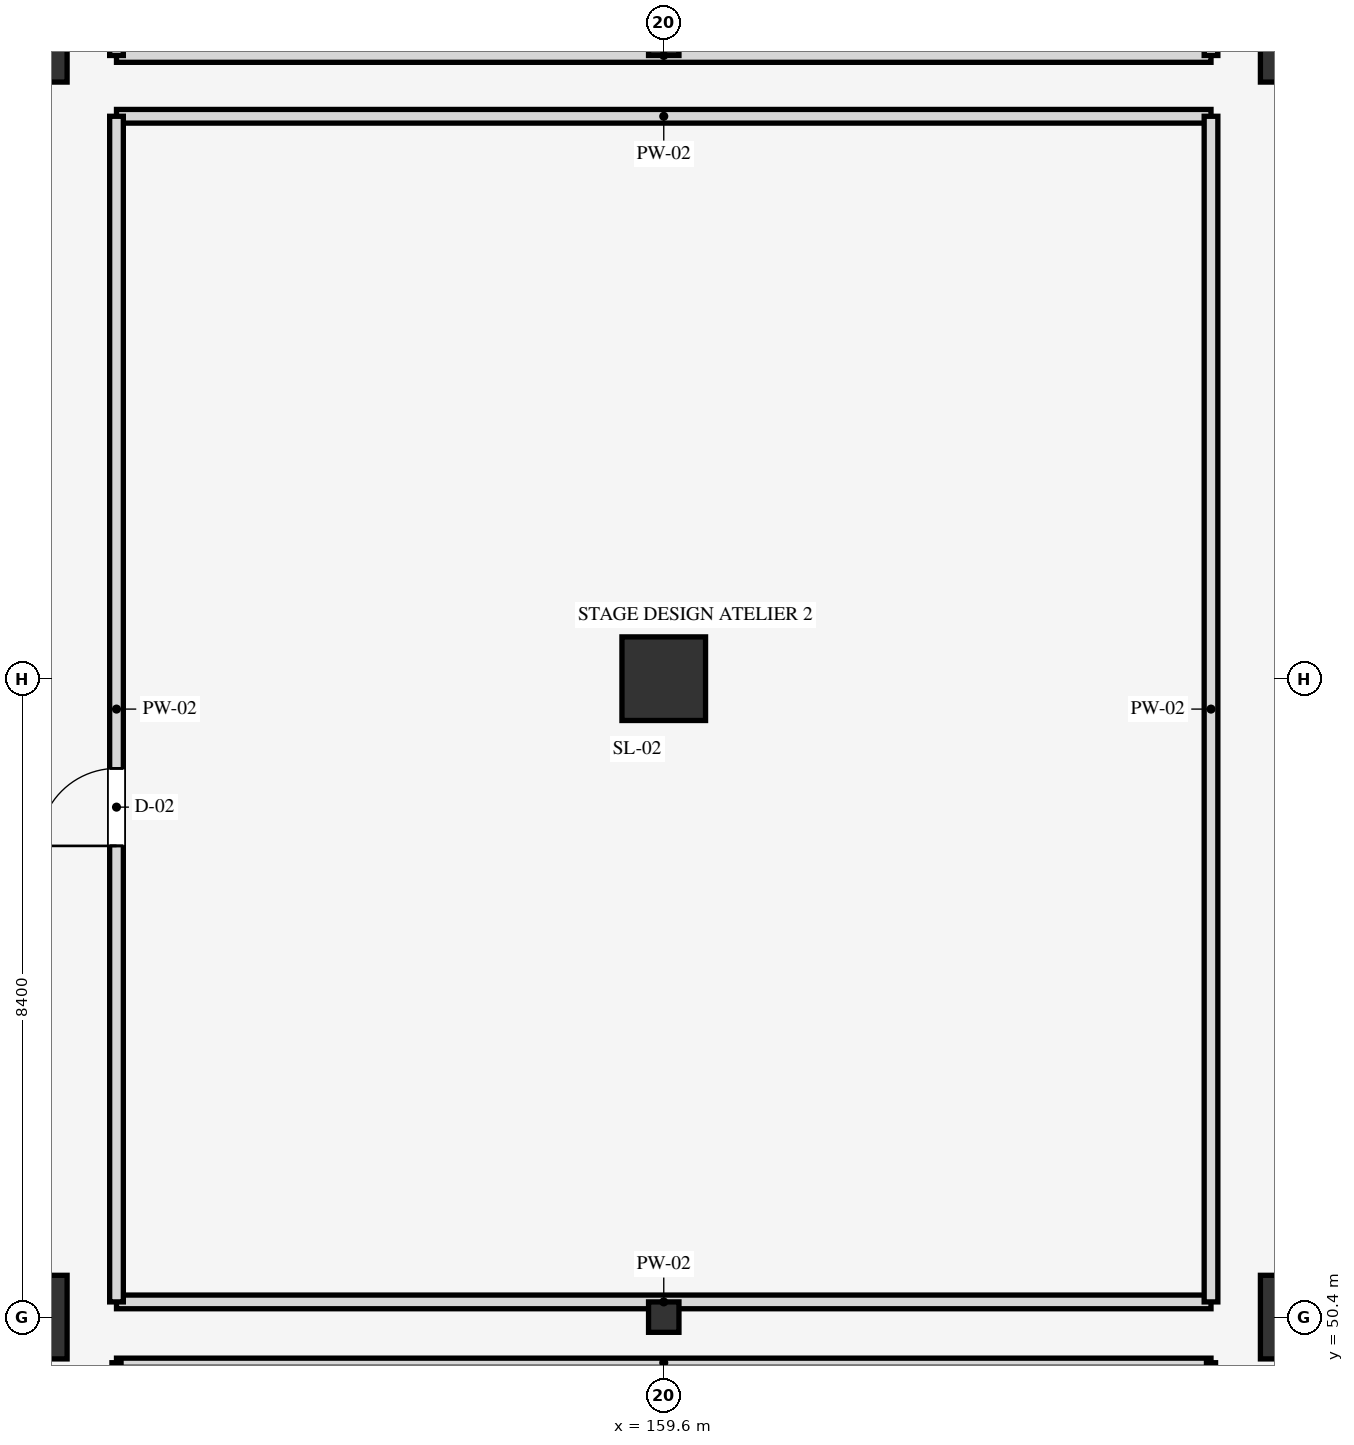
"""IFC4 building model, lengths in metres.
Left out: names, types, materials, properties, quantities, classifications, styles, units other than length and angle.
Written with IfcOpenShell. Run it as: python <this file> out.ifc"""

import sys

from ifc_helpers import new_model, si_unit, direction, frame, frame_2d, origin, origin_2d, place, context, subcontext, project, spatial, rectangle, i_section, extrude, element, fill, save


model = new_model("IFC4")
c1 = context("Model", 3, precision=1e-05, world=origin(), true_north=direction((0.0, 1.0)))
c2 = subcontext(c1, "Body", "Model", "MODEL_VIEW")
j1 = project(units=[si_unit("LENGTHUNIT", "METRE"), si_unit("PLANEANGLEUNIT", "RADIAN")], contexts=[c1])
p1 = place(None, origin())
s1 = spatial("IfcSite", under=j1, at=p1, CompositionType="ELEMENT")
p2 = place(p1, origin())
s2 = spatial("IfcBuilding", under=s1, at=p2, CompositionType="ELEMENT")
p3 = place(p2, frame((0.0, 0.0, 14.4)))
s3 = spatial("IfcBuildingStorey", under=s2, at=p3, CompositionType="ELEMENT", Elevation=14.4)
for number, where, z_axis, x_axis in (
    (1, (151.2, 50.4, 0.0), (0.0, 0.0, 1.0), (1.0, 0.0, 0.0)),
    (2, (151.2, 67.2, 0.0), (0.0, 0.0, 1.0), (1.0, 0.0, 0.0)),
):
    element("IfcColumn", number, at=place(p3, frame(where, z_axis=z_axis, x_axis=x_axis)), inside=s3, PredefinedType="COLUMN", context=c2, shape_type="SweptSolid", body=[
        extrude(rectangle(XDim=1.1, YDim=1.1, at=origin_2d()), origin(), (0.0, 0.0, 1.0), 4.5),
    ])
p4 = place(p3, frame((159.6, 50.4, 0.0), z_axis=(0.0, 0.0, 1.0), x_axis=(1.0, 0.0, 0.0)))
e3 = element("IfcColumn", 3, at=p4, inside=s3, PredefinedType="COLUMN", context=c2, shape_type="SweptSolid", body=[
    extrude(i_section(OverallWidth=0.4, OverallDepth=0.4, WebThickness=0.013, FlangeThickness=0.021, FilletRadius=0.022, at=origin_2d()), origin(), (0.0, 0.0, 1.0), 4.5),
])
p5 = place(p3, frame((159.6, 58.8, 0.0), z_axis=(0.0, 0.0, 1.0), x_axis=(1.0, 0.0, 0.0)))
e4 = element("IfcColumn", 4, at=p5, inside=s3, PredefinedType="COLUMN", context=c2, shape_type="SweptSolid", body=[
    extrude(rectangle(XDim=1.1, YDim=1.1, at=origin_2d()), origin(), (0.0, 0.0, 1.0), 4.5),
])
p6 = place(p3, frame((159.6, 67.2, 0.0), z_axis=(0.0, 0.0, 1.0), x_axis=(1.0, 0.0, 0.0)))
e5 = element("IfcColumn", 5, at=p6, inside=s3, PredefinedType="COLUMN", context=c2, shape_type="SweptSolid", body=[
    extrude(i_section(OverallWidth=0.4, OverallDepth=0.4, WebThickness=0.013, FlangeThickness=0.021, FilletRadius=0.022, at=origin_2d()), origin(), (0.0, 0.0, 1.0), 4.5),
])
for number, where, z_axis, x_axis in (
    (6, (168.0, 50.4, 0.0), (0.0, 0.0, 1.0), (1.0, 0.0, 0.0)),
    (7, (168.0, 67.2, 0.0), (0.0, 0.0, 1.0), (1.0, 0.0, 0.0)),
):
    element("IfcColumn", number, at=place(p3, frame(where, z_axis=z_axis, x_axis=x_axis)), inside=s3, PredefinedType="COLUMN", context=c2, shape_type="SweptSolid", body=[
        extrude(rectangle(XDim=1.1, YDim=1.1, at=origin_2d()), origin(), (0.0, 0.0, 1.0), 4.5),
    ])
p7 = place(p3, frame((152.4, 49.8, 0.0), z_axis=(0.0, 0.0, 1.0), x_axis=(1.0, 0.0, 0.0)))
e8 = element("IfcWall", 8, at=p7, inside=s3, PredefinedType="PARTITIONING", context=c2, shape_type="SweptSolid", body=[
    extrude(rectangle(XDim=14.4, YDim=0.12, at=frame_2d((7.2, 0.0))), origin(), (0.0, 0.0, 1.0), 3.54),
])
p8 = place(p3, frame((152.4, 34.4, 0.0), z_axis=(0.0, 0.0, 1.0), x_axis=(0.0, 1.0, 0.0)))
e9 = element("IfcWall", 9, at=p8, inside=s3, PredefinedType="PARTITIONING", context=c2, shape_type="SweptSolid", body=[
    extrude(rectangle(XDim=15.4, YDim=0.12, at=frame_2d((7.7, 0.0))), origin(), (0.0, 0.0, 1.0), 3.54),
])
p9 = place(p8, frame((5.75, 0.0, 0.0)))
e10 = element("IfcOpeningElement", 10, at=p9, cuts=e9, PredefinedType="OPENING", context=c2, shape_type="SweptSolid", body=[
    extrude(rectangle(XDim=1.42, YDim=2.18, at=frame_2d((0.71, 1.09))), frame((0.0, 0.07, 0.0), z_axis=(0.0, -1.0, 0.0), x_axis=(1.0, 0.0, 0.0)), (0.0, 0.0, 1.0), 0.14),
])
p10 = place(p3, frame((166.8, 34.4, 0.0), z_axis=(0.0, 0.0, 1.0), x_axis=(0.0, 1.0, 0.0)))
e11 = element("IfcWall", 11, at=p10, inside=s3, PredefinedType="PARTITIONING", context=c2, shape_type="SweptSolid", body=[
    extrude(rectangle(XDim=15.4, YDim=0.12, at=frame_2d((7.7, 0.0))), origin(), (0.0, 0.0, 1.0), 3.54),
])
for number, where, z_axis, x_axis in (
    (12, (152.4, 50.6, 0.0), (0.0, 0.0, 1.0), (1.0, 0.0, 0.0)),
    (13, (152.4, 66.2, 0.0), (0.0, 0.0, 1.0), (1.0, 0.0, 0.0)),
):
    element("IfcWall", number, at=place(p3, frame(where, z_axis=z_axis, x_axis=x_axis)), inside=s3, PredefinedType="PARTITIONING", context=c2, shape_type="SweptSolid", body=[
        extrude(rectangle(XDim=14.4, YDim=0.18, at=frame_2d((7.2, 0.0))), origin(), (0.0, 0.0, 1.0), 3.54),
    ])
p11 = place(p3, frame((152.4, 50.6, 0.0), z_axis=(0.0, 0.0, 1.0), x_axis=(0.0, 1.0, 0.0)))
e14 = element("IfcWall", 14, at=p11, inside=s3, PredefinedType="PARTITIONING", context=c2, shape_type="SweptSolid", body=[
    extrude(rectangle(XDim=15.6, YDim=0.18, at=frame_2d((7.8, 0.0))), origin(), (0.0, 0.0, 1.0), 3.54),
])
p12 = place(p11, frame((6.0, 0.0, 0.0)))
e15 = element("IfcOpeningElement", 15, at=p12, cuts=e14, PredefinedType="OPENING", context=c2, shape_type="SweptSolid", body=[
    extrude(rectangle(XDim=1.02, YDim=2.1, at=frame_2d((0.51, 1.05))), frame((0.0, 0.1, 0.0), z_axis=(0.0, -1.0, 0.0), x_axis=(1.0, 0.0, 0.0)), (0.0, 0.0, 1.0), 0.2),
])
p13 = place(p3, frame((166.8, 50.6, 0.0), z_axis=(0.0, 0.0, 1.0), x_axis=(0.0, 1.0, 0.0)))
e16 = element("IfcWall", 16, at=p13, inside=s3, PredefinedType="PARTITIONING", context=c2, shape_type="SweptSolid", body=[
    extrude(rectangle(XDim=15.6, YDim=0.18, at=frame_2d((7.8, 0.0))), origin(), (0.0, 0.0, 1.0), 3.54),
])
p14 = place(p3, frame((152.4, 67.0, 0.0), z_axis=(0.0, 0.0, 1.0), x_axis=(1.0, 0.0, 0.0)))
e17 = element("IfcWall", 17, at=p14, inside=s3, PredefinedType="PARTITIONING", context=c2, shape_type="SweptSolid", body=[
    extrude(rectangle(XDim=14.4, YDim=0.18, at=frame_2d((7.2, 0.0))), origin(), (0.0, 0.0, 1.0), 3.54),
])
p15 = place(p3, frame((152.4, 67.0, 0.0), z_axis=(0.0, 0.0, 1.0), x_axis=(0.0, 1.0, 0.0)))
e18 = element("IfcWall", 18, at=p15, inside=s3, PredefinedType="PARTITIONING", context=c2, shape_type="SweptSolid", body=[
    extrude(rectangle(XDim=16.2, YDim=0.18, at=frame_2d((8.1, 0.0))), origin(), (0.0, 0.0, 1.0), 3.54),
])
p16 = place(p15, frame((6.0, 0.0, 0.0)))
e19 = element("IfcOpeningElement", 19, at=p16, cuts=e18, PredefinedType="OPENING", context=c2, shape_type="SweptSolid", body=[
    extrude(rectangle(XDim=1.68, YDim=2.24, at=frame_2d((0.84, 1.12))), frame((0.0, 0.1, 0.0), z_axis=(0.0, -1.0, 0.0), x_axis=(1.0, 0.0, 0.0)), (0.0, 0.0, 1.0), 0.2),
])
p17 = place(p3, frame((166.8, 67.0, 0.0), z_axis=(0.0, 0.0, 1.0), x_axis=(0.0, 1.0, 0.0)))
e20 = element("IfcWall", 20, at=p17, inside=s3, PredefinedType="PARTITIONING", context=c2, shape_type="SweptSolid", body=[
    extrude(rectangle(XDim=16.2, YDim=0.18, at=frame_2d((8.1, 0.0))), origin(), (0.0, 0.0, 1.0), 3.54),
])
p18 = place(p12, origin())
e21 = element("IfcDoor", 21, at=p18, inside=s3, OperationType="SINGLE_SWING_LEFT", PredefinedType="DOOR", context=c2, shape_type="SweptSolid", body=[
    extrude(rectangle(XDim=1.02, YDim=2.1, at=frame_2d((0.51, 1.05))), frame((0.0, 0.025, 0.0), z_axis=(0.0, -1.0, 0.0), x_axis=(1.0, 0.0, 0.0)), (0.0, 0.0, 1.0), 0.05),
])
fill(e15, e21)
save(model, sys.argv[1])
